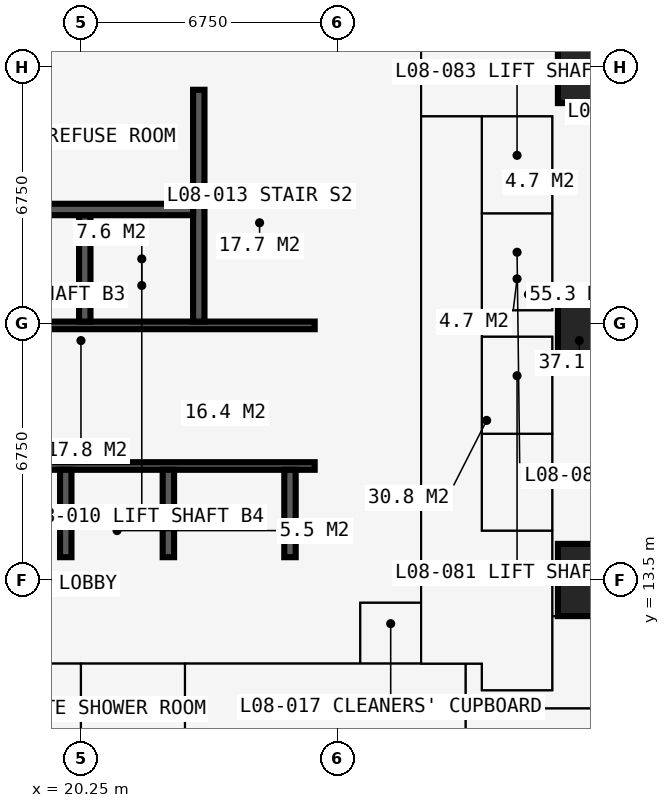
"""IFC4 building model, lengths in metres.
Left out: names, types, materials, properties, quantities, classifications, styles, units other than length and angle.
Written with IfcOpenShell. Run it as: python <this file> out.ifc"""

import sys

from ifc_helpers import new_model, si_unit, direction, frame, frame_2d, origin, origin_2d, place, context, subcontext, project, spatial, rectangle, extrude, element, fill, save


model = new_model("IFC4")
c1 = context("Model", 3, precision=1e-05, world=origin(), true_north=direction((0.0, 1.0)))
c2 = subcontext(c1, "Body", "Model", "MODEL_VIEW")
j1 = project(units=[si_unit("LENGTHUNIT", "METRE"), si_unit("PLANEANGLEUNIT", "RADIAN")], contexts=[c1])
p1 = place(None, origin())
s1 = spatial("IfcSite", under=j1, at=p1, CompositionType="ELEMENT")
p2 = place(p1, origin())
s2 = spatial("IfcBuilding", under=s1, at=p2, CompositionType="ELEMENT")
p3 = place(p2, frame((0.0, 0.0, 32.4)))
s3 = spatial("IfcBuildingStorey", under=s2, at=p3, CompositionType="ELEMENT", Elevation=32.4)
for number, where, z_axis, x_axis in (
    (1, (33.75, 13.5, 0.0), (0.0, 0.0, 1.0), (1.0, 0.0, 0.0)),
    (2, (33.75, 20.25, 0.0), (0.0, 0.0, 1.0), (1.0, 0.0, 0.0)),
    (3, (33.75, 27.0, 0.0), (0.0, 0.0, 1.0), (1.0, 0.0, 0.0)),
):
    element("IfcColumn", number, at=place(p3, frame(where, z_axis=z_axis, x_axis=x_axis)), inside=s3, PredefinedType="COLUMN", context=c2, shape_type="SweptSolid", body=[
        extrude(rectangle(XDim=1.9, YDim=1.9, at=origin_2d()), origin(), (0.0, 0.0, 1.0), 3.6),
    ])
p4 = place(p3, frame((12.9, 13.5, 0.0), z_axis=(0.0, 0.0, 1.0), x_axis=(1.0, 0.0, 0.0)))
e4 = element("IfcWall", 4, at=p4, inside=s3, PredefinedType="SHEAR", context=c2, shape_type="SweptSolid", body=[
    extrude(rectangle(XDim=14.7, YDim=1.2, at=frame_2d((7.35, 0.0))), origin(), (0.0, 0.0, 1.0), 3.6),
])
p5 = place(p3, frame((27.0, 14.1, 0.0), z_axis=(0.0, 0.0, 1.0), x_axis=(0.0, 1.0, 0.0)))
e5 = element("IfcWall", 5, at=p5, inside=s3, PredefinedType="SHEAR", context=c2, shape_type="SweptSolid", body=[
    extrude(rectangle(XDim=12.3, YDim=1.2, at=frame_2d((6.15, 0.0))), origin(), (0.0, 0.0, 1.0), 3.6),
])
p6 = place(p5, frame((3.65, 0.0, 0.0)))
e6 = element("IfcOpeningElement", 6, at=p6, cuts=e5, PredefinedType="OPENING", context=c2, shape_type="SweptSolid", body=[
    extrude(rectangle(XDim=1.2, YDim=2.2, at=frame_2d((0.6, 1.1))), frame((0.0, 0.61, 0.0), z_axis=(0.0, -1.0, 0.0), x_axis=(1.0, 0.0, 0.0)), (0.0, 0.0, 1.0), 1.22),
])
p7 = place(p3, frame((27.6, 27.0, 0.0), z_axis=(0.0, 0.0, 1.0), x_axis=(-1.0, 0.0, 0.0)))
e7 = element("IfcWall", 7, at=p7, inside=s3, PredefinedType="SHEAR", context=c2, shape_type="SweptSolid", body=[
    extrude(rectangle(XDim=14.7, YDim=1.2, at=frame_2d((7.35, 0.0))), origin(), (0.0, 0.0, 1.0), 3.6),
])
p8 = place(p7, frame((5.225, 0.0, 0.0)))
e8 = element("IfcOpeningElement", 8, at=p8, cuts=e7, PredefinedType="OPENING", context=c2, shape_type="SweptSolid", body=[
    extrude(rectangle(XDim=0.9, YDim=2.2, at=frame_2d((0.45, 1.1))), frame((0.0, 0.61, 0.0), z_axis=(0.0, -1.0, 0.0), x_axis=(1.0, 0.0, 0.0)), (0.0, 0.0, 1.0), 1.22),
])
p9 = place(p7, frame((8.2, 0.0, 0.0)))
e9 = element("IfcOpeningElement", 9, at=p9, cuts=e7, PredefinedType="OPENING", context=c2, shape_type="SweptSolid", body=[
    extrude(rectangle(XDim=1.0, YDim=2.2, at=frame_2d((0.5, 1.1))), frame((0.0, 0.61, 0.0), z_axis=(0.0, -1.0, 0.0), x_axis=(1.0, 0.0, 0.0)), (0.0, 0.0, 1.0), 1.22),
])
p10 = place(p3, frame((14.1, 16.5, 0.0), z_axis=(0.0, 0.0, 1.0), x_axis=(1.0, 0.0, 0.0)))
e10 = element("IfcWall", 10, at=p10, inside=s3, PredefinedType="SHEAR", context=c2, shape_type="SweptSolid", body=[
    extrude(rectangle(XDim=12.3, YDim=0.2, at=frame_2d((6.15, 0.0))), origin(), (0.0, 0.0, 1.0), 3.6),
])
p11 = place(p10, frame((0.9, 0.0, 0.0)))
e11 = element("IfcOpeningElement", 11, at=p11, cuts=e10, PredefinedType="OPENING", context=c2, shape_type="SweptSolid", body=[
    extrude(rectangle(XDim=1.1, YDim=2.2, at=frame_2d((0.55, 1.1))), frame((0.0, 0.11, 0.0), z_axis=(0.0, -1.0, 0.0), x_axis=(1.0, 0.0, 0.0)), (0.0, 0.0, 1.0), 0.22),
])
p12 = place(p10, frame((9.5, 0.0, 0.0)))
e12 = element("IfcOpeningElement", 12, at=p12, cuts=e10, PredefinedType="OPENING", context=c2, shape_type="SweptSolid", body=[
    extrude(rectangle(XDim=1.1, YDim=2.2, at=frame_2d((0.55, 1.1))), frame((0.0, 0.11, 0.0), z_axis=(0.0, -1.0, 0.0), x_axis=(1.0, 0.0, 0.0)), (0.0, 0.0, 1.0), 0.22),
])
p13 = place(p3, frame((14.1, 20.2, 0.0), z_axis=(0.0, 0.0, 1.0), x_axis=(1.0, 0.0, 0.0)))
e13 = element("IfcWall", 13, at=p13, inside=s3, PredefinedType="SHEAR", context=c2, shape_type="SweptSolid", body=[
    extrude(rectangle(XDim=12.3, YDim=0.2, at=frame_2d((6.15, 0.0))), origin(), (0.0, 0.0, 1.0), 3.6),
])
p14 = place(p13, frame((0.35, 0.0, 0.0)))
e14 = element("IfcOpeningElement", 14, at=p14, cuts=e13, PredefinedType="OPENING", context=c2, shape_type="SweptSolid", body=[
    extrude(rectangle(XDim=1.1, YDim=2.2, at=frame_2d((0.55, 1.1))), frame((0.0, 0.11, 0.0), z_axis=(0.0, -1.0, 0.0), x_axis=(1.0, 0.0, 0.0)), (0.0, 0.0, 1.0), 0.22),
])
p15 = place(p13, frame((9.75, 0.0, 0.0)))
e15 = element("IfcOpeningElement", 15, at=p15, cuts=e13, PredefinedType="OPENING", context=c2, shape_type="SweptSolid", body=[
    extrude(rectangle(XDim=1.1, YDim=2.2, at=frame_2d((0.55, 1.1))), frame((0.0, 0.11, 0.0), z_axis=(0.0, -1.0, 0.0), x_axis=(1.0, 0.0, 0.0)), (0.0, 0.0, 1.0), 0.22),
])
p16 = place(p3, frame((23.35, 20.3, 0.0), z_axis=(0.0, 0.0, 1.0), x_axis=(0.0, 1.0, 0.0)))
e16 = element("IfcWall", 16, at=p16, inside=s3, PredefinedType="SHEAR", context=c2, shape_type="SweptSolid", body=[
    extrude(rectangle(XDim=6.1, YDim=0.3, at=frame_2d((3.05, 0.0))), origin(), (0.0, 0.0, 1.0), 3.6),
])
p17 = place(p3, frame((20.35, 20.3, 0.0), z_axis=(0.0, 0.0, 1.0), x_axis=(0.0, 1.0, 0.0)))
e17 = element("IfcWall", 17, at=p17, inside=s3, PredefinedType="SHEAR", context=c2, shape_type="SweptSolid", body=[
    extrude(rectangle(XDim=2.8, YDim=0.3, at=frame_2d((1.4, 0.0))), origin(), (0.0, 0.0, 1.0), 3.6),
])
p18 = place(p3, frame((17.3, 23.25, 0.0), z_axis=(0.0, 0.0, 1.0), x_axis=(1.0, 0.0, 0.0)))
e18 = element("IfcWall", 18, at=p18, inside=s3, PredefinedType="SHEAR", context=c2, shape_type="SweptSolid", body=[
    extrude(rectangle(XDim=5.9, YDim=0.3, at=frame_2d((2.95, 0.0))), origin(), (0.0, 0.0, 1.0), 3.6),
])
for number, where, z_axis, x_axis in (
    (19, (19.85, 14.1, 0.0), (0.0, 0.0, 1.0), (0.0, 1.0, 0.0)),
    (20, (22.55, 14.1, 0.0), (0.0, 0.0, 1.0), (0.0, 1.0, 0.0)),
    (21, (25.75, 14.1, 0.0), (0.0, 0.0, 1.0), (0.0, 1.0, 0.0)),
):
    element("IfcWall", number, at=place(p3, frame(where, z_axis=z_axis, x_axis=x_axis)), inside=s3, PredefinedType="SHEAR", context=c2, shape_type="SweptSolid", body=[
        extrude(rectangle(XDim=2.3, YDim=0.3, at=frame_2d((1.15, 0.0))), origin(), (0.0, 0.0, 1.0), 3.6),
    ])
p19 = place(p3, frame((21.625, 16.6, 0.0), z_axis=(0.0, 0.0, 1.0), x_axis=(0.0, 1.0, 0.0)))
e22 = element("IfcWall", 22, at=p19, inside=s3, PredefinedType="PARTITIONING", context=c2, shape_type="SweptSolid", body=[
    extrude(rectangle(XDim=3.5, YDim=0.15, at=frame_2d((1.75, 0.0))), origin(), (0.0, 0.0, 1.0), 3.375),
])
p20 = place(p19, frame((1.15, 0.0, 0.0)))
e23 = element("IfcOpeningElement", 23, at=p20, cuts=e22, PredefinedType="OPENING", context=c2, shape_type="SweptSolid", body=[
    extrude(rectangle(XDim=1.2, YDim=2.2, at=frame_2d((0.6, 1.1))), frame((0.0, 0.085, 0.0), z_axis=(0.0, -1.0, 0.0), x_axis=(1.0, 0.0, 0.0)), (0.0, 0.0, 1.0), 0.17),
])
p21 = place(p3, frame((20.12, 16.6, 0.0), z_axis=(0.0, 0.0, 1.0), x_axis=(0.0, 1.0, 0.0)))
e24 = element("IfcWall", 24, at=p21, inside=s3, PredefinedType="PARTITIONING", context=c2, shape_type="SweptSolid", body=[
    extrude(rectangle(XDim=3.5, YDim=0.15, at=frame_2d((1.75, 0.0))), origin(), (0.0, 0.0, 1.0), 3.375),
])
p22 = place(p3, frame((10.125, 11.3, 0.0), z_axis=(0.0, 0.0, 1.0), x_axis=(1.0, 0.0, 0.0)))
e25 = element("IfcWall", 25, at=p22, inside=s3, PredefinedType="PARTITIONING", context=c2, shape_type="SweptSolid", body=[
    extrude(rectangle(XDim=20.675, YDim=0.15, at=frame_2d((10.337, 0.0))), origin(), (0.0, 0.0, 1.0), 3.375),
])
p23 = place(p22, frame((8.375, 0.0, 0.0)))
e26 = element("IfcOpeningElement", 26, at=p23, cuts=e25, PredefinedType="OPENING", context=c2, shape_type="SweptSolid", body=[
    extrude(rectangle(XDim=1.0, YDim=2.2, at=frame_2d((0.5, 1.1))), frame((0.0, 0.085, 0.0), z_axis=(0.0, -1.0, 0.0), x_axis=(1.0, 0.0, 0.0)), (0.0, 0.0, 1.0), 0.17),
])
p24 = place(p22, frame((10.975, 0.0, 0.0)))
e27 = element("IfcOpeningElement", 27, at=p24, cuts=e25, PredefinedType="OPENING", context=c2, shape_type="SweptSolid", body=[
    extrude(rectangle(XDim=1.0, YDim=2.2, at=frame_2d((0.5, 1.1))), frame((0.0, 0.085, 0.0), z_axis=(0.0, -1.0, 0.0), x_axis=(1.0, 0.0, 0.0)), (0.0, 0.0, 1.0), 0.17),
])
p25 = place(p22, frame((3.925, 0.0, 0.0)))
e28 = element("IfcOpeningElement", 28, at=p25, cuts=e25, PredefinedType="OPENING", context=c2, shape_type="SweptSolid", body=[
    extrude(rectangle(XDim=0.95, YDim=2.2, at=frame_2d((0.475, 1.1))), frame((0.0, 0.085, 0.0), z_axis=(0.0, -1.0, 0.0), x_axis=(1.0, 0.0, 0.0)), (0.0, 0.0, 1.0), 0.17),
])
p26 = place(p3, frame((20.25, -0.734, 0.0), z_axis=(0.0, 0.0, 1.0), x_axis=(0.0, 1.0, 0.0)))
e29 = element("IfcWall", 29, at=p26, inside=s3, PredefinedType="PARTITIONING", context=c2, shape_type="SweptSolid", body=[
    extrude(rectangle(XDim=12.034, YDim=0.15, at=frame_2d((6.017, 0.0))), origin(), (0.0, 0.0, 1.0), 2.61),
])
p27 = place(p3, frame((22.988, 5.65, 0.0), z_axis=(0.0, 0.0, 1.0), x_axis=(0.0, 1.0, 0.0)))
e30 = element("IfcWall", 30, at=p27, inside=s3, PredefinedType="PARTITIONING", context=c2, shape_type="SweptSolid", body=[
    extrude(rectangle(XDim=5.65, YDim=0.15, at=frame_2d((2.825, 0.0))), origin(), (0.0, 0.0, 1.0), 3.375),
])
p28 = place(p3, frame((27.6, 11.3, 0.0), z_axis=(0.0, 0.0, 1.0), x_axis=(0.0, 1.0, 0.0)))
e31 = element("IfcWall", 31, at=p28, inside=s3, PredefinedType="PARTITIONING", context=c2, shape_type="SweptSolid", body=[
    extrude(rectangle(XDim=1.6, YDim=0.15, at=frame_2d((0.8, 0.0))), origin(), (0.0, 0.0, 1.0), 3.375),
])
p29 = place(p28, frame((0.3, 0.0, 0.0)))
e32 = element("IfcOpeningElement", 32, at=p29, cuts=e31, PredefinedType="OPENING", context=c2, shape_type="SweptSolid", body=[
    extrude(rectangle(XDim=0.95, YDim=2.2, at=frame_2d((0.475, 1.1))), frame((0.0, 0.085, 0.0), z_axis=(0.0, -1.0, 0.0), x_axis=(1.0, 0.0, 0.0)), (0.0, 0.0, 1.0), 0.17),
])
p30 = place(p3, frame((27.6, 12.9, 0.0), z_axis=(0.0, 0.0, 1.0), x_axis=(1.0, 0.0, 0.0)))
e33 = element("IfcWall", 33, at=p30, inside=s3, PredefinedType="PARTITIONING", context=c2, shape_type="SweptSolid", body=[
    extrude(rectangle(XDim=1.6, YDim=0.15, at=frame_2d((0.8, 0.0))), origin(), (0.0, 0.0, 1.0), 2.877),
])
p31 = place(p3, frame((29.2, 11.3, 0.0), z_axis=(0.0, 0.0, 1.0), x_axis=(0.0, 1.0, 0.0)))
e34 = element("IfcWall", 34, at=p31, inside=s3, PredefinedType="PARTITIONING", context=c2, shape_type="SweptSolid", body=[
    extrude(rectangle(XDim=17.9, YDim=0.2, at=frame_2d((8.95, 0.0))), origin(), (0.0, 0.0, 1.0), 3.375),
])
p32 = place(p31, frame((8.35, 0.0, 0.0)))
e35 = element("IfcOpeningElement", 35, at=p32, cuts=e34, PredefinedType="OPENING", context=c2, shape_type="SweptSolid", body=[
    extrude(rectangle(XDim=1.2, YDim=2.2, at=frame_2d((0.6, 1.1))), frame((0.0, 0.11, 0.0), z_axis=(0.0, -1.0, 0.0), x_axis=(1.0, 0.0, 0.0)), (0.0, 0.0, 1.0), 0.22),
])
p33 = place(p3, frame((29.2, 25.7, 0.0), z_axis=(0.0, 0.0, 1.0), x_axis=(1.0, 0.0, 0.0)))
e36 = element("IfcWall", 36, at=p33, inside=s3, PredefinedType="SHEAR", context=c2, shape_type="SweptSolid", body=[
    extrude(rectangle(XDim=3.45, YDim=0.1, at=frame_2d((1.725, 0.0))), origin(), (0.0, 0.0, 1.0), 3.375),
])
p34 = place(p3, frame((30.375, -0.734, 0.0), z_axis=(0.0, 0.0, 1.0), x_axis=(0.0, 1.0, 0.0)))
e37 = element("IfcWall", 37, at=p34, inside=s3, PredefinedType="PARTITIONING", context=c2, shape_type="SweptSolid", body=[
    extrude(rectangle(XDim=12.034, YDim=0.15, at=frame_2d((6.017, 0.0))), origin(), (0.0, 0.0, 1.0), 3.375),
])
p35 = place(p3, frame((30.375, 10.125, 0.0), z_axis=(0.0, 0.0, 1.0), x_axis=(1.0, 0.0, 0.0)))
e38 = element("IfcWall", 38, at=p35, inside=s3, PredefinedType="PARTITIONING", context=c2, shape_type="SweptSolid", body=[
    extrude(rectangle(XDim=10.859, YDim=0.15, at=frame_2d((5.429, 0.0))), origin(), (0.0, 0.0, 1.0), 3.375),
])
p36 = place(p35, frame((2.5, 0.0, 0.0)))
e39 = element("IfcOpeningElement", 39, at=p36, cuts=e38, PredefinedType="OPENING", context=c2, shape_type="SweptSolid", body=[
    extrude(rectangle(XDim=1.0, YDim=2.2, at=frame_2d((0.5, 1.1))), frame((0.0, 0.085, 0.0), z_axis=(0.0, -1.0, 0.0), x_axis=(1.0, 0.0, 0.0)), (0.0, 0.0, 1.0), 0.17),
])
p37 = place(p3, frame((30.8, 10.6, 0.0), z_axis=(0.0, 0.0, 1.0), x_axis=(0.0, 1.0, 0.0)))
e40 = element("IfcWall", 40, at=p37, inside=s3, PredefinedType="PARTITIONING", context=c2, shape_type="SweptSolid", body=[
    extrude(rectangle(XDim=0.7, YDim=0.15, at=frame_2d((0.35, 0.0))), origin(), (0.0, 0.0, 1.0), 3.375),
])
p38 = place(p3, frame((30.8, 10.6, 0.0), z_axis=(0.0, 0.0, 1.0), x_axis=(1.0, 0.0, 0.0)))
e41 = element("IfcWall", 41, at=p38, inside=s3, PredefinedType="PARTITIONING", context=c2, shape_type="SweptSolid", body=[
    extrude(rectangle(XDim=1.85, YDim=0.15, at=frame_2d((0.925, 0.0))), origin(), (0.0, 0.0, 1.0), 3.375),
])
p39 = place(p3, frame((30.8, 14.8, 0.0), z_axis=(0.0, 0.0, 1.0), x_axis=(0.0, 1.0, 0.0)))
e42 = element("IfcWall", 42, at=p39, inside=s3, PredefinedType="PARTITIONING", context=c2, shape_type="SweptSolid", body=[
    extrude(rectangle(XDim=10.9, YDim=0.15, at=frame_2d((5.45, 0.0))), origin(), (0.0, 0.0, 1.0), 3.375),
])
p40 = place(p39, frame((0.75, 0.0, 0.0)))
e43 = element("IfcOpeningElement", 43, at=p40, cuts=e42, PredefinedType="OPENING", context=c2, shape_type="SweptSolid", body=[
    extrude(rectangle(XDim=1.1, YDim=2.2, at=frame_2d((0.55, 1.1))), frame((0.0, 0.085, 0.0), z_axis=(0.0, -1.0, 0.0), x_axis=(1.0, 0.0, 0.0)), (0.0, 0.0, 1.0), 0.17),
])
p41 = place(p39, frame((3.25, 0.0, 0.0)))
e44 = element("IfcOpeningElement", 44, at=p41, cuts=e42, PredefinedType="OPENING", context=c2, shape_type="SweptSolid", body=[
    extrude(rectangle(XDim=1.1, YDim=2.2, at=frame_2d((0.55, 1.1))), frame((0.0, 0.085, 0.0), z_axis=(0.0, -1.0, 0.0), x_axis=(1.0, 0.0, 0.0)), (0.0, 0.0, 1.0), 0.17),
])
p42 = place(p39, frame((6.5, 0.0, 0.0)))
e45 = element("IfcOpeningElement", 45, at=p42, cuts=e42, PredefinedType="OPENING", context=c2, shape_type="SweptSolid", body=[
    extrude(rectangle(XDim=1.1, YDim=2.2, at=frame_2d((0.55, 1.1))), frame((0.0, 0.085, 0.0), z_axis=(0.0, -1.0, 0.0), x_axis=(1.0, 0.0, 0.0)), (0.0, 0.0, 1.0), 0.17),
])
p43 = place(p39, frame((9.05, 0.0, 0.0)))
e46 = element("IfcOpeningElement", 46, at=p43, cuts=e42, PredefinedType="OPENING", context=c2, shape_type="SweptSolid", body=[
    extrude(rectangle(XDim=1.1, YDim=2.2, at=frame_2d((0.55, 1.1))), frame((0.0, 0.085, 0.0), z_axis=(0.0, -1.0, 0.0), x_axis=(1.0, 0.0, 0.0)), (0.0, 0.0, 1.0), 0.17),
])
for number, where, z_axis, x_axis in (
    (47, (30.8, 14.8, 0.0), (0.0, 0.0, 1.0), (1.0, 0.0, 0.0)),
    (48, (30.8, 17.35, 0.0), (0.0, 0.0, 1.0), (1.0, 0.0, 0.0)),
    (49, (30.8, 19.9, 0.0), (0.0, 0.0, 1.0), (1.0, 0.0, 0.0)),
    (50, (30.8, 20.6, 0.0), (0.0, 0.0, 1.0), (1.0, 0.0, 0.0)),
    (51, (30.8, 23.15, 0.0), (0.0, 0.0, 1.0), (1.0, 0.0, 0.0)),
):
    element("IfcWall", number, at=place(p3, frame(where, z_axis=z_axis, x_axis=x_axis)), inside=s3, PredefinedType="SHEAR", context=c2, shape_type="SweptSolid", body=[
        extrude(rectangle(XDim=1.85, YDim=0.1, at=frame_2d((0.925, 0.0))), origin(), (0.0, 0.0, 1.0), 3.375),
    ])
p44 = place(p3, frame((32.65, 10.6, 0.0), z_axis=(0.0, 0.0, 1.0), x_axis=(0.0, 1.0, 0.0)))
e52 = element("IfcWall", 52, at=p44, inside=s3, PredefinedType="SHEAR", context=c2, shape_type="SweptSolid", body=[
    extrude(rectangle(XDim=9.3, YDim=0.1, at=frame_2d((4.65, 0.0))), origin(), (0.0, 0.0, 1.0), 3.375),
])
p45 = place(p44, frame((0.5, 0.0, 0.0)))
e53 = element("IfcOpeningElement", 53, at=p45, cuts=e52, PredefinedType="OPENING", context=c2, shape_type="SweptSolid", body=[
    extrude(rectangle(XDim=1.0, YDim=2.2, at=frame_2d((0.5, 1.1))), frame((0.0, 0.06, 0.0), z_axis=(0.0, -1.0, 0.0), x_axis=(1.0, 0.0, 0.0)), (0.0, 0.0, 1.0), 0.12),
])
p46 = place(p3, frame((32.65, 12.55, 0.0), z_axis=(0.0, 0.0, 1.0), x_axis=(1.0, 0.0, 0.0)))
e54 = element("IfcWall", 54, at=p46, inside=s3, PredefinedType="PARTITIONING", context=c2, shape_type="SweptSolid", body=[
    extrude(rectangle(XDim=2.2, YDim=0.15, at=frame_2d((1.1, 0.0))), origin(), (0.0, 0.0, 1.0), 3.375),
])
p47 = place(p3, frame((32.65, 20.6, 0.0), z_axis=(0.0, 0.0, 1.0), x_axis=(0.0, 1.0, 0.0)))
e55 = element("IfcWall", 55, at=p47, inside=s3, PredefinedType="PARTITIONING", context=c2, shape_type="SweptSolid", body=[
    extrude(rectangle(XDim=5.1, YDim=0.15, at=frame_2d((2.55, 0.0))), origin(), (0.0, 0.0, 1.0), 3.375),
])
p48 = place(p12, origin())
e56 = element("IfcDoor", 56, at=p48, inside=s3, OperationType="DOUBLE_DOOR_SLIDING", PredefinedType="DOOR", context=c2, shape_type="SweptSolid", body=[
    extrude(rectangle(XDim=1.1, YDim=2.2, at=frame_2d((0.55, 1.1))), frame((0.0, 0.025, 0.0), z_axis=(0.0, -1.0, 0.0), x_axis=(1.0, 0.0, 0.0)), (0.0, 0.0, 1.0), 0.05),
])
fill(e12, e56)
p49 = place(p6, origin())
e57 = element("IfcDoor", 57, at=p49, inside=s3, OperationType="DOUBLE_DOOR_SINGLE_SWING", PredefinedType="DOOR", context=c2, shape_type="SweptSolid", body=[
    extrude(rectangle(XDim=1.2, YDim=2.2, at=frame_2d((0.6, 1.1))), frame((0.0, 0.025, 0.0), z_axis=(0.0, -1.0, 0.0), x_axis=(1.0, 0.0, 0.0)), (0.0, 0.0, 1.0), 0.05),
])
fill(e6, e57)
p50 = place(p20, origin())
e58 = element("IfcDoor", 58, at=p50, inside=s3, OperationType="DOUBLE_DOOR_SINGLE_SWING", PredefinedType="DOOR", context=c2, shape_type="SweptSolid", body=[
    extrude(rectangle(XDim=1.2, YDim=2.2, at=frame_2d((0.6, 1.1))), frame((0.0, 0.025, 0.0), z_axis=(0.0, -1.0, 0.0), x_axis=(1.0, 0.0, 0.0)), (0.0, 0.0, 1.0), 0.05),
])
fill(e23, e58)
p51 = place(p8, origin())
e59 = element("IfcDoor", 59, at=p51, inside=s3, OperationType="SINGLE_SWING_LEFT", PredefinedType="DOOR", context=c2, shape_type="SweptSolid", body=[
    extrude(rectangle(XDim=0.9, YDim=2.2, at=frame_2d((0.45, 1.1))), frame((0.0, 0.4, 0.0), z_axis=(0.0, -1.0, 0.0), x_axis=(1.0, 0.0, 0.0)), (0.0, 0.0, 1.0), 0.8),
])
fill(e8, e59)
p52 = place(p15, origin())
e60 = element("IfcDoor", 60, at=p52, inside=s3, OperationType="SINGLE_SWING_LEFT", PredefinedType="DOOR", context=c2, shape_type="SweptSolid", body=[
    extrude(rectangle(XDim=1.1, YDim=2.2, at=frame_2d((0.55, 1.1))), frame((0.0, 0.025, 0.0), z_axis=(0.0, -1.0, 0.0), x_axis=(1.0, 0.0, 0.0)), (0.0, 0.0, 1.0), 0.05),
])
fill(e15, e60)
p53 = place(p29, origin())
e61 = element("IfcDoor", 61, at=p53, inside=s3, OperationType="SINGLE_SWING_LEFT", PredefinedType="DOOR", context=c2, shape_type="SweptSolid", body=[
    extrude(rectangle(XDim=0.95, YDim=2.2, at=frame_2d((0.475, 1.1))), frame((0.0, 0.025, 0.0), z_axis=(0.0, -1.0, 0.0), x_axis=(1.0, 0.0, 0.0)), (0.0, 0.0, 1.0), 0.05),
])
fill(e32, e61)
p54 = place(p24, origin())
e62 = element("IfcDoor", 62, at=p54, inside=s3, OperationType="SINGLE_SWING_LEFT", PredefinedType="DOOR", context=c2, shape_type="SweptSolid", body=[
    extrude(rectangle(XDim=1.0, YDim=2.2, at=frame_2d((0.5, 1.1))), frame((0.0, 0.025, 0.0), z_axis=(0.0, -1.0, 0.0), x_axis=(1.0, 0.0, 0.0)), (0.0, 0.0, 1.0), 0.05),
])
fill(e27, e62)
p55 = place(p36, origin())
e63 = element("IfcDoor", 63, at=p55, inside=s3, OperationType="SINGLE_SWING_LEFT", PredefinedType="DOOR", context=c2, shape_type="SweptSolid", body=[
    extrude(rectangle(XDim=1.0, YDim=2.2, at=frame_2d((0.5, 1.1))), frame((0.0, 0.025, 0.0), z_axis=(0.0, -1.0, 0.0), x_axis=(1.0, 0.0, 0.0)), (0.0, 0.0, 1.0), 0.05),
])
fill(e39, e63)
p56 = place(p45, origin())
e64 = element("IfcDoor", 64, at=p56, inside=s3, OperationType="SINGLE_SWING_LEFT", PredefinedType="DOOR", context=c2, shape_type="SweptSolid", body=[
    extrude(rectangle(XDim=1.0, YDim=2.2, at=frame_2d((0.5, 1.1))), frame((0.0, 0.025, 0.0), z_axis=(0.0, -1.0, 0.0), x_axis=(1.0, 0.0, 0.0)), (0.0, 0.0, 1.0), 0.05),
])
fill(e53, e64)
p57 = place(p40, origin())
e65 = element("IfcDoor", 65, at=p57, inside=s3, OperationType="DOUBLE_DOOR_SLIDING", PredefinedType="DOOR", context=c2, shape_type="SweptSolid", body=[
    extrude(rectangle(XDim=1.1, YDim=2.2, at=frame_2d((0.55, 1.1))), frame((0.0, 0.025, 0.0), z_axis=(0.0, -1.0, 0.0), x_axis=(1.0, 0.0, 0.0)), (0.0, 0.0, 1.0), 0.05),
])
fill(e43, e65)
p58 = place(p41, origin())
e66 = element("IfcDoor", 66, at=p58, inside=s3, OperationType="DOUBLE_DOOR_SLIDING", PredefinedType="DOOR", context=c2, shape_type="SweptSolid", body=[
    extrude(rectangle(XDim=1.1, YDim=2.2, at=frame_2d((0.55, 1.1))), frame((0.0, 0.025, 0.0), z_axis=(0.0, -1.0, 0.0), x_axis=(1.0, 0.0, 0.0)), (0.0, 0.0, 1.0), 0.05),
])
fill(e44, e66)
p59 = place(p42, origin())
e67 = element("IfcDoor", 67, at=p59, inside=s3, OperationType="DOUBLE_DOOR_SLIDING", PredefinedType="DOOR", context=c2, shape_type="SweptSolid", body=[
    extrude(rectangle(XDim=1.1, YDim=2.2, at=frame_2d((0.55, 1.1))), frame((0.0, 0.025, 0.0), z_axis=(0.0, -1.0, 0.0), x_axis=(1.0, 0.0, 0.0)), (0.0, 0.0, 1.0), 0.05),
])
fill(e45, e67)
p60 = place(p43, origin())
e68 = element("IfcDoor", 68, at=p60, inside=s3, OperationType="DOUBLE_DOOR_SLIDING", PredefinedType="DOOR", context=c2, shape_type="SweptSolid", body=[
    extrude(rectangle(XDim=1.1, YDim=2.2, at=frame_2d((0.55, 1.1))), frame((0.0, 0.025, 0.0), z_axis=(0.0, -1.0, 0.0), x_axis=(1.0, 0.0, 0.0)), (0.0, 0.0, 1.0), 0.05),
])
fill(e46, e68)
p61 = place(p32, origin())
e69 = element("IfcDoor", 69, at=p61, inside=s3, OperationType="DOUBLE_DOOR_SINGLE_SWING", PredefinedType="DOOR", context=c2, shape_type="SweptSolid", body=[
    extrude(rectangle(XDim=1.2, YDim=2.2, at=frame_2d((0.6, 1.1))), frame((0.0, 0.025, 0.0), z_axis=(0.0, -1.0, 0.0), x_axis=(1.0, 0.0, 0.0)), (0.0, 0.0, 1.0), 0.05),
])
fill(e35, e69)
save(model, sys.argv[1])
